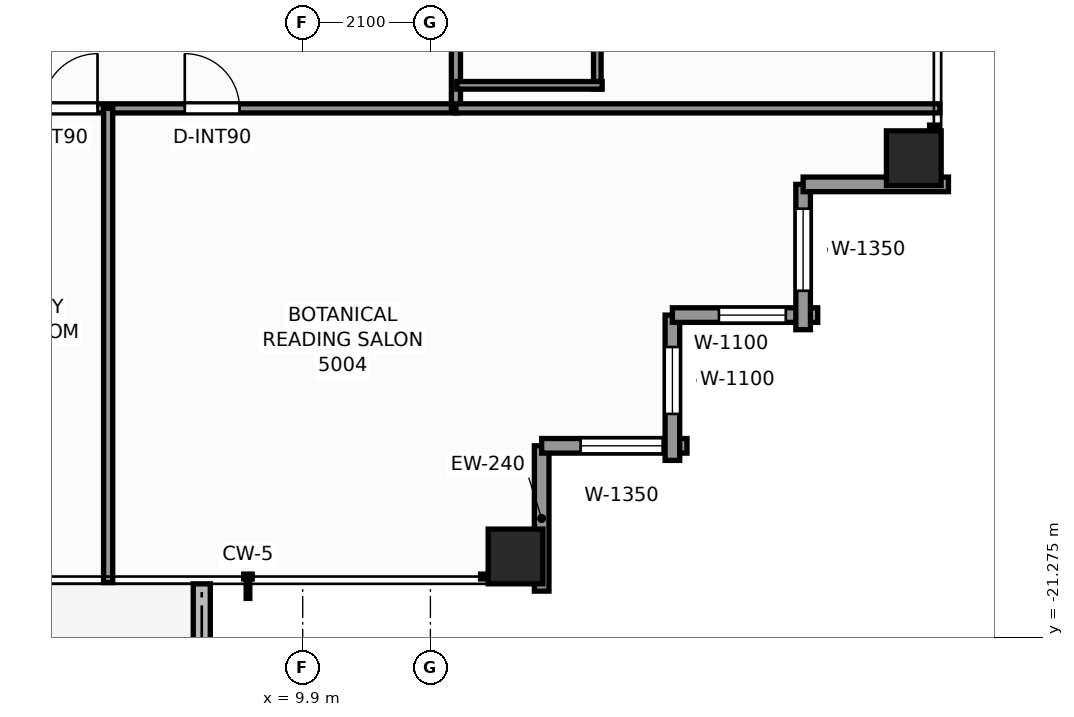
"""IFC4 building model, lengths in metres.
Left out: names, types, materials, properties, quantities, classifications, styles, units other than length and angle.
Written with IfcOpenShell. Run it as: python <this file> out.ifc"""

import sys

from ifc_helpers import new_model, si_unit, direction, frame, frame_2d, origin, origin_2d, place, context, subcontext, project, spatial, rectangle, extrude, element, fill, save


model = new_model("IFC4")
c1 = context("Model", 3, precision=1e-05, world=origin(), true_north=direction((0.0, 1.0)))
c2 = subcontext(c1, "Body", "Model", "MODEL_VIEW")
j1 = project(units=[si_unit("LENGTHUNIT", "METRE"), si_unit("PLANEANGLEUNIT", "RADIAN")], contexts=[c1])
p1 = place(None, origin())
s1 = spatial("IfcSite", under=j1, at=p1, CompositionType="ELEMENT")
p2 = place(p1, origin())
s2 = spatial("IfcBuilding", under=s1, at=p2, CompositionType="ELEMENT")
p3 = place(p2, frame((0.0, 0.0, 173.4)))
s3 = spatial("IfcBuildingStorey", under=s2, at=p3, CompositionType="ELEMENT", Elevation=173.4)
for number, where, z_axis, x_axis in (
    (1, (13.4, -19.95, 0.0), (0.0, 0.0, 1.0), (1.0, 0.0, 0.0)),
    (2, (19.95, -13.4, 0.0), (0.0, 0.0, 1.0), (1.0, 0.0, 0.0)),
):
    element("IfcColumn", number, at=place(p3, frame(where, z_axis=z_axis, x_axis=x_axis)), inside=s3, PredefinedType="COLUMN", context=c2, shape_type="SweptSolid", body=[
        extrude(rectangle(XDim=0.9, YDim=0.9, at=origin_2d()), origin(), (0.0, 0.0, 1.0), 3.3),
    ])
p4 = place(p3, frame((8.24, -23.074, -0.04), z_axis=(0.0, 0.0, 1.0), x_axis=(0.0, 1.0, 0.0)))
e3 = element("IfcWall", 3, at=p4, inside=s3, PredefinedType="PARAPET", context=c2, shape_type="SweptSolid", body=[
    extrude(rectangle(XDim=2.674, YDim=0.28, at=frame_2d((1.337, 0.0))), origin(), (0.0, 0.0, 1.0), 0.42),
])
p5 = place(p3, frame((13.83, -18.13, 0.0), z_axis=(0.0, 0.0, 1.0), x_axis=(0.0, -1.0, 0.0)))
e4 = element("IfcWall", 4, at=p5, inside=s3, PredefinedType="STANDARD", context=c2, shape_type="SweptSolid", body=[
    extrude(rectangle(XDim=2.39, YDim=0.24, at=frame_2d((1.195, 0.0))), origin(), (0.0, 0.0, 1.0), 2.463),
])
p6 = place(p3, frame((16.22, -18.13, 0.0), z_axis=(0.0, 0.0, 1.0), x_axis=(-1.0, 0.0, 0.0)))
e5 = element("IfcWall", 5, at=p6, inside=s3, PredefinedType="STANDARD", context=c2, shape_type="SweptSolid", body=[
    extrude(rectangle(XDim=2.39, YDim=0.24, at=frame_2d((1.195, 0.0))), origin(), (0.0, 0.0, 1.0), 2.463),
])
p7 = place(p6, frame((0.4, 0.0, 0.65)))
e6 = element("IfcOpeningElement", 6, at=p7, cuts=e5, PredefinedType="OPENING", context=c2, shape_type="SweptSolid", body=[
    extrude(rectangle(XDim=1.35, YDim=1.55, at=frame_2d((0.675, 0.775))), frame((0.0, 0.13, 0.0), z_axis=(0.0, -1.0, 0.0), x_axis=(1.0, 0.0, 0.0)), (0.0, 0.0, 1.0), 0.26),
])
p8 = place(p3, frame((15.98, -15.98, 0.0), z_axis=(0.0, 0.0, 1.0), x_axis=(0.0, -1.0, 0.0)))
e7 = element("IfcWall", 7, at=p8, inside=s3, PredefinedType="STANDARD", context=c2, shape_type="SweptSolid", body=[
    extrude(rectangle(XDim=2.39, YDim=0.24, at=frame_2d((1.195, 0.0))), origin(), (0.0, 0.0, 1.0), 2.463),
])
p9 = place(p8, frame((0.525, 0.0, 0.65)))
e8 = element("IfcOpeningElement", 8, at=p9, cuts=e7, PredefinedType="OPENING", context=c2, shape_type="SweptSolid", body=[
    extrude(rectangle(XDim=1.1, YDim=1.45, at=frame_2d((0.55, 0.725))), frame((0.0, 0.13, 0.0), z_axis=(0.0, -1.0, 0.0), x_axis=(1.0, 0.0, 0.0)), (0.0, 0.0, 1.0), 0.26),
])
p10 = place(p3, frame((18.37, -15.98, 0.0), z_axis=(0.0, 0.0, 1.0), x_axis=(-1.0, 0.0, 0.0)))
e9 = element("IfcWall", 9, at=p10, inside=s3, PredefinedType="STANDARD", context=c2, shape_type="SweptSolid", body=[
    extrude(rectangle(XDim=2.39, YDim=0.24, at=frame_2d((1.195, 0.0))), origin(), (0.0, 0.0, 1.0), 2.463),
])
p11 = place(p10, frame((0.525, 0.0, 0.65)))
e10 = element("IfcOpeningElement", 10, at=p11, cuts=e9, PredefinedType="OPENING", context=c2, shape_type="SweptSolid", body=[
    extrude(rectangle(XDim=1.1, YDim=1.45, at=frame_2d((0.55, 0.725))), frame((0.0, 0.13, 0.0), z_axis=(0.0, -1.0, 0.0), x_axis=(1.0, 0.0, 0.0)), (0.0, 0.0, 1.0), 0.26),
])
p12 = place(p3, frame((18.13, -13.83, 0.0), z_axis=(0.0, 0.0, 1.0), x_axis=(0.0, -1.0, 0.0)))
e11 = element("IfcWall", 11, at=p12, inside=s3, PredefinedType="STANDARD", context=c2, shape_type="SweptSolid", body=[
    extrude(rectangle(XDim=2.39, YDim=0.24, at=frame_2d((1.195, 0.0))), origin(), (0.0, 0.0, 1.0), 2.463),
])
p13 = place(p12, frame((0.4, 0.0, 0.65)))
e12 = element("IfcOpeningElement", 12, at=p13, cuts=e11, PredefinedType="OPENING", context=c2, shape_type="SweptSolid", body=[
    extrude(rectangle(XDim=1.35, YDim=1.55, at=frame_2d((0.675, 0.775))), frame((0.0, 0.13, 0.0), z_axis=(0.0, -1.0, 0.0), x_axis=(1.0, 0.0, 0.0)), (0.0, 0.0, 1.0), 0.26),
])
p14 = place(p3, frame((20.52, -13.83, 0.0), z_axis=(0.0, 0.0, 1.0), x_axis=(-1.0, 0.0, 0.0)))
e13 = element("IfcWall", 13, at=p14, inside=s3, PredefinedType="STANDARD", context=c2, shape_type="SweptSolid", body=[
    extrude(rectangle(XDim=2.39, YDim=0.24, at=frame_2d((1.195, 0.0))), origin(), (0.0, 0.0, 1.0), 2.463),
])
p15 = place(p3, frame((-12.58, -12.58, 0.0), z_axis=(0.0, 0.0, 1.0), x_axis=(1.0, 0.0, 0.0)))
e14 = element("IfcWall", 14, at=p15, inside=s3, PredefinedType="PARTITIONING", context=c2, shape_type="SweptSolid", body=[
    extrude(rectangle(XDim=25.0, YDim=0.15, at=frame_2d((12.5, 0.0))), origin(), (0.0, 0.0, 1.0), 2.369),
])
p16 = place(p15, frame((3.639, 0.0, 0.0)))
e15 = element("IfcOpeningElement", 15, at=p16, cuts=e14, PredefinedType="OPENING", context=c2, shape_type="SweptSolid", body=[
    extrude(rectangle(XDim=0.9, YDim=2.06, at=frame_2d((0.45, 1.03))), frame((0.0, 0.085, 0.0), z_axis=(0.0, -1.0, 0.0), x_axis=(1.0, 0.0, 0.0)), (0.0, 0.0, 1.0), 0.17),
])
p17 = place(p15, frame((5.974, 0.0, 0.0)))
e16 = element("IfcOpeningElement", 16, at=p17, cuts=e14, PredefinedType="OPENING", context=c2, shape_type="SweptSolid", body=[
    extrude(rectangle(XDim=0.9, YDim=2.06, at=frame_2d((0.45, 1.03))), frame((0.0, 0.085, 0.0), z_axis=(0.0, -1.0, 0.0), x_axis=(1.0, 0.0, 0.0)), (0.0, 0.0, 1.0), 0.17),
])
p18 = place(p15, frame((10.708, 0.0, 0.0)))
e17 = element("IfcOpeningElement", 17, at=p18, cuts=e14, PredefinedType="OPENING", context=c2, shape_type="SweptSolid", body=[
    extrude(rectangle(XDim=0.9, YDim=2.06, at=frame_2d((0.45, 1.03))), frame((0.0, 0.085, 0.0), z_axis=(0.0, -1.0, 0.0), x_axis=(1.0, 0.0, 0.0)), (0.0, 0.0, 1.0), 0.17),
])
p19 = place(p15, frame((13.698, 0.0, 0.0)))
e18 = element("IfcOpeningElement", 18, at=p19, cuts=e14, PredefinedType="OPENING", context=c2, shape_type="SweptSolid", body=[
    extrude(rectangle(XDim=0.95, YDim=2.06, at=frame_2d((0.475, 1.03))), frame((0.0, 0.085, 0.0), z_axis=(0.0, -1.0, 0.0), x_axis=(1.0, 0.0, 0.0)), (0.0, 0.0, 1.0), 0.17),
])
p20 = place(p15, frame((18.206, 0.0, 0.0)))
e19 = element("IfcOpeningElement", 19, at=p20, cuts=e14, PredefinedType="OPENING", context=c2, shape_type="SweptSolid", body=[
    extrude(rectangle(XDim=0.9, YDim=2.06, at=frame_2d((0.45, 1.03))), frame((0.0, 0.085, 0.0), z_axis=(0.0, -1.0, 0.0), x_axis=(1.0, 0.0, 0.0)), (0.0, 0.0, 1.0), 0.17),
])
p21 = place(p15, frame((20.541, 0.0, 0.0)))
e20 = element("IfcOpeningElement", 20, at=p21, cuts=e14, PredefinedType="OPENING", context=c2, shape_type="SweptSolid", body=[
    extrude(rectangle(XDim=0.9, YDim=2.06, at=frame_2d((0.45, 1.03))), frame((0.0, 0.085, 0.0), z_axis=(0.0, -1.0, 0.0), x_axis=(1.0, 0.0, 0.0)), (0.0, 0.0, 1.0), 0.17),
])
p22 = place(p3, frame((12.42, -12.58, 0.0), z_axis=(0.0, 0.0, 1.0), x_axis=(0.0, 1.0, 0.0)))
e21 = element("IfcWall", 21, at=p22, inside=s3, PredefinedType="PARTITIONING", context=c2, shape_type="SweptSolid", body=[
    extrude(rectangle(XDim=24.84, YDim=0.15, at=frame_2d((12.42, 0.0))), origin(), (0.0, 0.0, 1.0), 2.369),
])
p23 = place(p22, frame((3.573, 0.0, 0.0)))
e22 = element("IfcOpeningElement", 22, at=p23, cuts=e21, PredefinedType="OPENING", context=c2, shape_type="SweptSolid", body=[
    extrude(rectangle(XDim=0.95, YDim=2.06, at=frame_2d((0.475, 1.03))), frame((0.0, 0.085, 0.0), z_axis=(0.0, -1.0, 0.0), x_axis=(1.0, 0.0, 0.0)), (0.0, 0.0, 1.0), 0.17),
])
p24 = place(p22, frame((10.075, 0.0, 0.0)))
e23 = element("IfcOpeningElement", 23, at=p24, cuts=e21, PredefinedType="OPENING", context=c2, shape_type="SweptSolid", body=[
    extrude(rectangle(XDim=0.95, YDim=2.06, at=frame_2d((0.475, 1.03))), frame((0.0, 0.085, 0.0), z_axis=(0.0, -1.0, 0.0), x_axis=(1.0, 0.0, 0.0)), (0.0, 0.0, 1.0), 0.17),
])
p25 = place(p22, frame((19.64, 0.0, 0.0)))
e24 = element("IfcOpeningElement", 24, at=p25, cuts=e21, PredefinedType="OPENING", context=c2, shape_type="SweptSolid", body=[
    extrude(rectangle(XDim=0.95, YDim=2.06, at=frame_2d((0.475, 1.03))), frame((0.0, 0.085, 0.0), z_axis=(0.0, -1.0, 0.0), x_axis=(1.0, 0.0, 0.0)), (0.0, 0.0, 1.0), 0.17),
])
p26 = place(p3, frame((12.42, -12.58, 0.0), z_axis=(0.0, 0.0, 1.0), x_axis=(1.0, 0.0, 0.0)))
e25 = element("IfcWall", 25, at=p26, inside=s3, PredefinedType="PARTITIONING", context=c2, shape_type="SweptSolid", body=[
    extrude(rectangle(XDim=7.96, YDim=0.15, at=frame_2d((3.98, 0.0))), origin(), (0.0, 0.0, 1.0), 2.369),
])
p27 = place(p3, frame((6.7, -20.38, 0.0), z_axis=(0.0, 0.0, 1.0), x_axis=(0.0, 1.0, 0.0)))
e26 = element("IfcWall", 26, at=p27, inside=s3, PredefinedType="PARTITIONING", context=c2, shape_type="SweptSolid", body=[
    extrude(rectangle(XDim=7.8, YDim=0.15, at=frame_2d((3.9, 0.0))), origin(), (0.0, 0.0, 1.0), 2.453),
])
p28 = place(p3, frame((14.745, -12.261, 0.0), z_axis=(0.0, 0.0, 1.0), x_axis=(0.0, 1.0, 0.0)))
e27 = element("IfcWall", 27, at=p28, inside=s3, PredefinedType="PARTITIONING", context=c2, shape_type="SweptSolid", body=[
    extrude(rectangle(XDim=2.77, YDim=0.125, at=frame_2d((1.385, 0.0))), origin(), (0.0, 0.0, 1.0), 2.369),
])
p29 = place(p3, frame((12.435, -12.201, 0.0), z_axis=(0.0, 0.0, 1.0), x_axis=(1.0, 0.0, 0.0)))
e28 = element("IfcWall", 28, at=p29, inside=s3, PredefinedType="PARTITIONING", context=c2, shape_type="SweptSolid", body=[
    extrude(rectangle(XDim=2.39, YDim=0.125, at=frame_2d((1.195, 0.0))), origin(), (0.0, 0.0, 1.0), 3.08),
])
p30 = place(p7, origin())
e29 = element("IfcWindow", 29, at=p30, inside=s3, PartitioningType="SINGLE_PANEL", PredefinedType="WINDOW", context=c2, shape_type="SweptSolid", body=[
    extrude(rectangle(XDim=1.35, YDim=1.55, at=frame_2d((0.675, 0.775))), frame((0.0, 0.03, 0.0), z_axis=(0.0, -1.0, 0.0), x_axis=(1.0, 0.0, 0.0)), (0.0, 0.0, 1.0), 0.06),
])
fill(e6, e29)
p31 = place(p9, origin())
e30 = element("IfcWindow", 30, at=p31, inside=s3, PartitioningType="SINGLE_PANEL", PredefinedType="WINDOW", context=c2, shape_type="SweptSolid", body=[
    extrude(rectangle(XDim=1.1, YDim=1.45, at=frame_2d((0.55, 0.725))), frame((0.0, 0.03, 0.0), z_axis=(0.0, -1.0, 0.0), x_axis=(1.0, 0.0, 0.0)), (0.0, 0.0, 1.0), 0.06),
])
fill(e8, e30)
p32 = place(p11, origin())
e31 = element("IfcWindow", 31, at=p32, inside=s3, PartitioningType="SINGLE_PANEL", PredefinedType="WINDOW", context=c2, shape_type="SweptSolid", body=[
    extrude(rectangle(XDim=1.1, YDim=1.45, at=frame_2d((0.55, 0.725))), frame((0.0, 0.03, 0.0), z_axis=(0.0, -1.0, 0.0), x_axis=(1.0, 0.0, 0.0)), (0.0, 0.0, 1.0), 0.06),
])
fill(e10, e31)
p33 = place(p13, origin())
e32 = element("IfcWindow", 32, at=p33, inside=s3, PartitioningType="SINGLE_PANEL", PredefinedType="WINDOW", context=c2, shape_type="SweptSolid", body=[
    extrude(rectangle(XDim=1.35, YDim=1.55, at=frame_2d((0.675, 0.775))), frame((0.0, 0.03, 0.0), z_axis=(0.0, -1.0, 0.0), x_axis=(1.0, 0.0, 0.0)), (0.0, 0.0, 1.0), 0.06),
])
fill(e12, e32)
p34 = place(p20, origin())
e33 = element("IfcDoor", 33, at=p34, inside=s3, OperationType="SINGLE_SWING_RIGHT", PredefinedType="DOOR", context=c2, shape_type="SweptSolid", body=[
    extrude(rectangle(XDim=0.9, YDim=2.06, at=frame_2d((0.45, 1.03))), frame((0.0, 0.025, 0.0), z_axis=(0.0, -1.0, 0.0), x_axis=(1.0, 0.0, 0.0)), (0.0, 0.0, 1.0), 0.05),
])
fill(e19, e33)
p35 = place(p21, origin())
e34 = element("IfcDoor", 34, at=p35, inside=s3, OperationType="SINGLE_SWING_LEFT", PredefinedType="DOOR", context=c2, shape_type="SweptSolid", body=[
    extrude(rectangle(XDim=0.9, YDim=2.06, at=frame_2d((0.45, 1.03))), frame((0.0, 0.025, 0.0), z_axis=(0.0, -1.0, 0.0), x_axis=(1.0, 0.0, 0.0)), (0.0, 0.0, 1.0), 0.05),
])
fill(e20, e34)
save(model, sys.argv[1])
